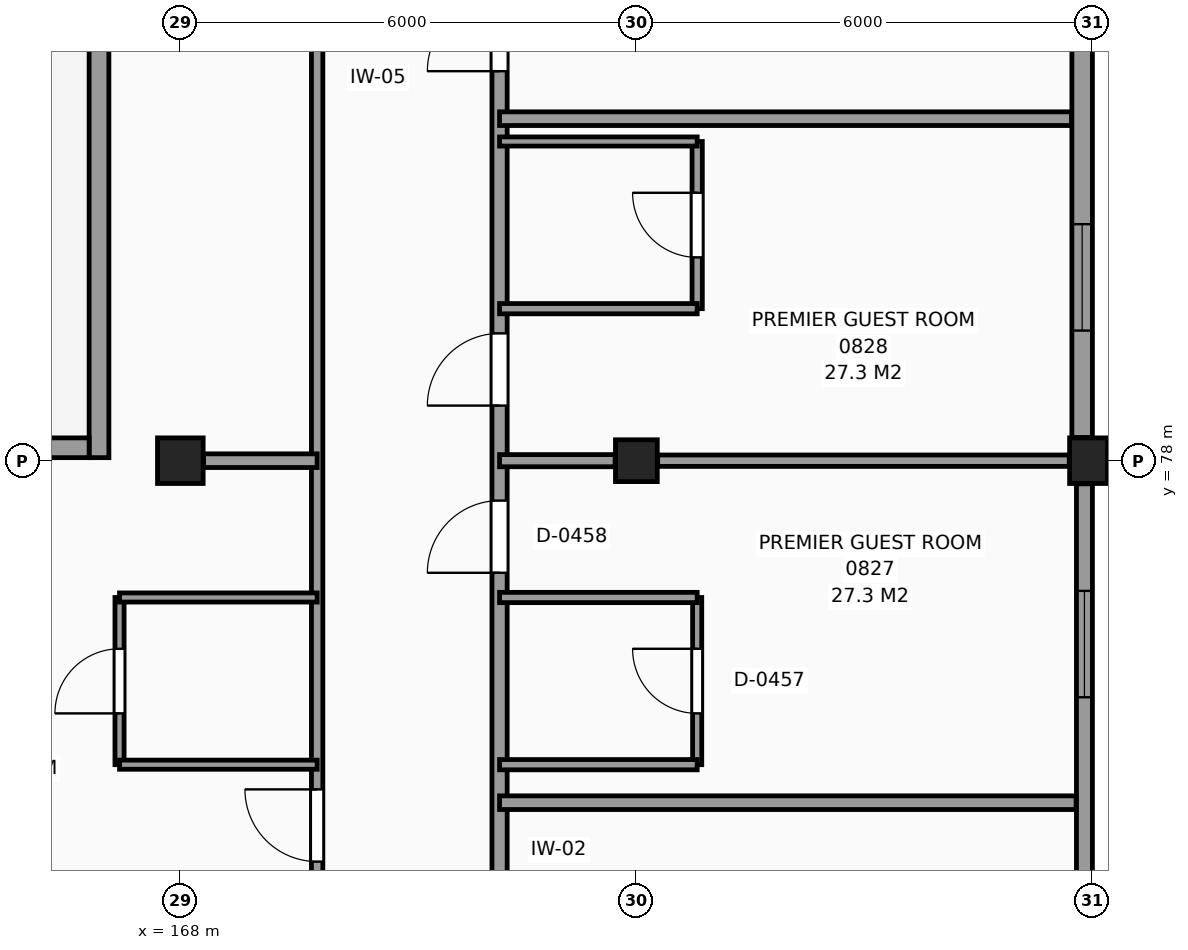
"""IFC4 building model, lengths in metres.
Left out: names, types, materials, properties, quantities, classifications, styles, units other than length and angle.
Written with IfcOpenShell. Run it as: python <this file> out.ifc"""

import sys

from ifc_helpers import new_model, si_unit, direction, frame, frame_2d, origin, origin_2d, place, context, subcontext, project, spatial, rectangle, extrude, element, fill, save


model = new_model("IFC4")
c1 = context("Model", 3, precision=1e-05, world=origin(), true_north=direction((0.0, 1.0)))
c2 = subcontext(c1, "Body", "Model", "MODEL_VIEW")
j1 = project(units=[si_unit("LENGTHUNIT", "METRE"), si_unit("PLANEANGLEUNIT", "RADIAN")], contexts=[c1])
p1 = place(None, origin())
s1 = spatial("IfcSite", under=j1, at=p1, CompositionType="ELEMENT")
p2 = place(p1, origin())
s2 = spatial("IfcBuilding", under=s1, at=p2, CompositionType="ELEMENT")
p3 = place(p2, frame((0.0, 0.0, 34.8)))
s3 = spatial("IfcBuildingStorey", under=s2, at=p3, CompositionType="ELEMENT", Elevation=34.8)
p4 = place(p3, frame((168.0, 78.0, 0.0), z_axis=(0.0, 0.0, 1.0), x_axis=(1.0, 0.0, 0.0)))
e1 = element("IfcColumn", 1, at=p4, inside=s3, PredefinedType="COLUMN", context=c2, shape_type="SweptSolid", body=[
    extrude(rectangle(XDim=0.6, YDim=0.6, at=origin_2d()), origin(), (0.0, 0.0, 1.0), 3.3),
])
p5 = place(p3, frame((174.0, 78.0, 0.0), z_axis=(0.0, 0.0, 1.0), x_axis=(1.0, 0.0, 0.0)))
e2 = element("IfcColumn", 2, at=p5, inside=s3, PredefinedType="COLUMN", context=c2, shape_type="SweptSolid", body=[
    extrude(rectangle(XDim=0.55, YDim=0.55, at=origin_2d()), origin(), (0.0, 0.0, 1.0), 3.3),
])
p6 = place(p3, frame((180.0, 78.0, 0.0), z_axis=(0.0, 0.0, 1.0), x_axis=(1.0, 0.0, 0.0)))
e3 = element("IfcColumn", 3, at=p6, inside=s3, PredefinedType="COLUMN", context=c2, shape_type="SweptSolid", body=[
    extrude(rectangle(XDim=0.6, YDim=0.6, at=origin_2d()), origin(), (0.0, 0.0, 1.0), 3.3),
])
p7 = place(p3, frame((179.895, 72.305, 0.0), z_axis=(0.0, 0.0, 1.0), x_axis=(0.0, 1.0, 0.0)))
e4 = element("IfcWall", 4, at=p7, inside=s3, PredefinedType="SOLIDWALL", context=c2, shape_type="SweptSolid", body=[
    extrude(rectangle(XDim=5.39, YDim=0.21, at=frame_2d((2.695, 0.0))), origin(), (0.0, 0.0, 1.0), 2.42),
])
p8 = place(p7, frame((2.582, 0.0, 0.8)))
e5 = element("IfcOpeningElement", 5, at=p8, cuts=e4, PredefinedType="OPENING", context=c2, shape_type="SweptSolid", body=[
    extrude(rectangle(XDim=1.4, YDim=1.4, at=frame_2d((0.7, 0.7))), frame((0.0, 0.115, 0.0), z_axis=(0.0, -1.0, 0.0), x_axis=(1.0, 0.0, 0.0)), (0.0, 0.0, 1.0), 0.23),
])
p9 = place(p3, frame((179.865, 78.305, 0.0), z_axis=(0.0, 0.0, 1.0), x_axis=(0.0, 1.0, 0.0)))
e6 = element("IfcWall", 6, at=p9, inside=s3, PredefinedType="SOLIDWALL", context=c2, shape_type="SweptSolid", body=[
    extrude(rectangle(XDim=5.39, YDim=0.27, at=frame_2d((2.695, 0.0))), origin(), (0.0, 0.0, 1.0), 2.42),
])
p10 = place(p9, frame((1.407, 0.0, 0.8)))
e7 = element("IfcOpeningElement", 7, at=p10, cuts=e6, PredefinedType="OPENING", context=c2, shape_type="SweptSolid", body=[
    extrude(rectangle(XDim=1.4, YDim=1.4, at=frame_2d((0.7, 0.7))), frame((0.0, 0.145, 0.0), z_axis=(0.0, -1.0, 0.0), x_axis=(1.0, 0.0, 0.0)), (0.0, 0.0, 1.0), 0.29),
])
p11 = place(p3, frame((166.93, 78.04, 0.0), z_axis=(0.0, 0.0, 1.0), x_axis=(0.0, 1.0, 0.0)))
e8 = element("IfcWall", 8, at=p11, inside=s3, PredefinedType="SHEAR", context=c2, shape_type="SweptSolid", body=[
    extrude(rectangle(XDim=10.72, YDim=0.26, at=frame_2d((5.36, 0.0))), origin(), (0.0, 0.0, 1.0), 3.3),
])
p12 = place(p3, frame((163.2, 78.17, 0.0), z_axis=(0.0, 0.0, 1.0), x_axis=(1.0, 0.0, 0.0)))
e9 = element("IfcWall", 9, at=p12, inside=s3, PredefinedType="SHEAR", context=c2, shape_type="SweptSolid", body=[
    extrude(rectangle(XDim=3.6, YDim=0.26, at=frame_2d((1.8, 0.0))), origin(), (0.0, 0.0, 1.0), 3.3),
])
p13 = place(p3, frame((167.2, 74.0, 0.0), z_axis=(0.0, 0.0, 1.0), x_axis=(0.0, 1.0, 0.0)))
e10 = element("IfcWall", 10, at=p13, inside=s3, PredefinedType="PARTITIONING", context=c2, shape_type="SweptSolid", body=[
    extrude(rectangle(XDim=2.2, YDim=0.12, at=frame_2d((1.1, 0.0))), origin(), (0.0, 0.0, 1.0), 3.07),
])
p14 = place(p13, frame((0.675, 0.0, 0.0)))
e11 = element("IfcOpeningElement", 11, at=p14, cuts=e10, PredefinedType="OPENING", context=c2, shape_type="SweptSolid", body=[
    extrude(rectangle(XDim=0.85, YDim=2.1, at=frame_2d((0.425, 1.05))), frame((0.0, 0.07, 0.0), z_axis=(0.0, -1.0, 0.0), x_axis=(1.0, 0.0, 0.0)), (0.0, 0.0, 1.0), 0.14),
])
p15 = place(p3, frame((169.8, 42.235, 0.0), z_axis=(0.0, 0.0, 1.0), x_axis=(0.0, 1.0, 0.0)))
e12 = element("IfcWall", 12, at=p15, inside=s3, PredefinedType="PARTITIONING", context=c2, shape_type="SweptSolid", body=[
    extrude(rectangle(XDim=65.585, YDim=0.15, at=frame_2d((32.792, 0.0))), origin(), (0.0, 0.0, 1.0), 3.07),
])
p16 = place(p15, frame((50.165, 0.0, 0.0)))
e13 = element("IfcOpeningElement", 13, at=p16, cuts=e12, PredefinedType="OPENING", context=c2, shape_type="SweptSolid", body=[
    extrude(rectangle(XDim=1.2, YDim=2.2, at=frame_2d((0.6, 1.1))), frame((0.0, 0.085, 0.0), z_axis=(0.0, -1.0, 0.0), x_axis=(1.0, 0.0, 0.0)), (0.0, 0.0, 1.0), 0.17),
])
p17 = place(p15, frame((0.44, 0.0, 0.0)))
e14 = element("IfcOpeningElement", 14, at=p17, cuts=e12, PredefinedType="OPENING", context=c2, shape_type="SweptSolid", body=[
    extrude(rectangle(XDim=0.95, YDim=2.1, at=frame_2d((0.475, 1.05))), frame((0.0, 0.085, 0.0), z_axis=(0.0, -1.0, 0.0), x_axis=(1.0, 0.0, 0.0)), (0.0, 0.0, 1.0), 0.17),
])
p18 = place(p15, frame((6.49, 0.0, 0.0)))
e15 = element("IfcOpeningElement", 15, at=p18, cuts=e12, PredefinedType="OPENING", context=c2, shape_type="SweptSolid", body=[
    extrude(rectangle(XDim=0.95, YDim=2.1, at=frame_2d((0.475, 1.05))), frame((0.0, 0.085, 0.0), z_axis=(0.0, -1.0, 0.0), x_axis=(1.0, 0.0, 0.0)), (0.0, 0.0, 1.0), 0.17),
])
p19 = place(p15, frame((12.49, 0.0, 0.0)))
e16 = element("IfcOpeningElement", 16, at=p19, cuts=e12, PredefinedType="OPENING", context=c2, shape_type="SweptSolid", body=[
    extrude(rectangle(XDim=0.95, YDim=2.1, at=frame_2d((0.475, 1.05))), frame((0.0, 0.085, 0.0), z_axis=(0.0, -1.0, 0.0), x_axis=(1.0, 0.0, 0.0)), (0.0, 0.0, 1.0), 0.17),
])
p20 = place(p15, frame((18.49, 0.0, 0.0)))
e17 = element("IfcOpeningElement", 17, at=p20, cuts=e12, PredefinedType="OPENING", context=c2, shape_type="SweptSolid", body=[
    extrude(rectangle(XDim=0.95, YDim=2.1, at=frame_2d((0.475, 1.05))), frame((0.0, 0.085, 0.0), z_axis=(0.0, -1.0, 0.0), x_axis=(1.0, 0.0, 0.0)), (0.0, 0.0, 1.0), 0.17),
])
p21 = place(p15, frame((24.49, 0.0, 0.0)))
e18 = element("IfcOpeningElement", 18, at=p21, cuts=e12, PredefinedType="OPENING", context=c2, shape_type="SweptSolid", body=[
    extrude(rectangle(XDim=0.95, YDim=2.1, at=frame_2d((0.475, 1.05))), frame((0.0, 0.085, 0.0), z_axis=(0.0, -1.0, 0.0), x_axis=(1.0, 0.0, 0.0)), (0.0, 0.0, 1.0), 0.17),
])
p22 = place(p15, frame((30.49, 0.0, 0.0)))
e19 = element("IfcOpeningElement", 19, at=p22, cuts=e12, PredefinedType="OPENING", context=c2, shape_type="SweptSolid", body=[
    extrude(rectangle(XDim=0.95, YDim=2.1, at=frame_2d((0.475, 1.05))), frame((0.0, 0.085, 0.0), z_axis=(0.0, -1.0, 0.0), x_axis=(1.0, 0.0, 0.0)), (0.0, 0.0, 1.0), 0.17),
])
p23 = place(p15, frame((54.49, 0.0, 0.0)))
e20 = element("IfcOpeningElement", 20, at=p23, cuts=e12, PredefinedType="OPENING", context=c2, shape_type="SweptSolid", body=[
    extrude(rectangle(XDim=0.95, YDim=2.1, at=frame_2d((0.475, 1.05))), frame((0.0, 0.085, 0.0), z_axis=(0.0, -1.0, 0.0), x_axis=(1.0, 0.0, 0.0)), (0.0, 0.0, 1.0), 0.17),
])
p24 = place(p15, frame((60.49, 0.0, 0.0)))
e21 = element("IfcOpeningElement", 21, at=p24, cuts=e12, PredefinedType="OPENING", context=c2, shape_type="SweptSolid", body=[
    extrude(rectangle(XDim=0.95, YDim=2.1, at=frame_2d((0.475, 1.05))), frame((0.0, 0.085, 0.0), z_axis=(0.0, -1.0, 0.0), x_axis=(1.0, 0.0, 0.0)), (0.0, 0.0, 1.0), 0.17),
])
p25 = place(p3, frame((172.2, 42.235, 0.0), z_axis=(0.0, 0.0, 1.0), x_axis=(0.0, 1.0, 0.0)))
e22 = element("IfcWall", 22, at=p25, inside=s3, PredefinedType="PARTITIONING", context=c2, shape_type="SweptSolid", body=[
    extrude(rectangle(XDim=65.585, YDim=0.2, at=frame_2d((32.792, 0.0))), origin(), (0.0, 0.0, 1.0), 3.07),
])
p26 = place(p25, frame((7.59, 0.0, 0.0)))
e23 = element("IfcOpeningElement", 23, at=p26, cuts=e22, PredefinedType="OPENING", context=c2, shape_type="SweptSolid", body=[
    extrude(rectangle(XDim=0.95, YDim=2.1, at=frame_2d((0.475, 1.05))), frame((0.0, 0.11, 0.0), z_axis=(0.0, -1.0, 0.0), x_axis=(1.0, 0.0, 0.0)), (0.0, 0.0, 1.0), 0.22),
])
p27 = place(p25, frame((12.09, 0.0, 0.0)))
e24 = element("IfcOpeningElement", 24, at=p27, cuts=e22, PredefinedType="OPENING", context=c2, shape_type="SweptSolid", body=[
    extrude(rectangle(XDim=0.95, YDim=2.1, at=frame_2d((0.475, 1.05))), frame((0.0, 0.11, 0.0), z_axis=(0.0, -1.0, 0.0), x_axis=(1.0, 0.0, 0.0)), (0.0, 0.0, 1.0), 0.22),
])
p28 = place(p25, frame((16.29, 0.0, 0.0)))
e25 = element("IfcOpeningElement", 25, at=p28, cuts=e22, PredefinedType="OPENING", context=c2, shape_type="SweptSolid", body=[
    extrude(rectangle(XDim=0.95, YDim=2.1, at=frame_2d((0.475, 1.05))), frame((0.0, 0.11, 0.0), z_axis=(0.0, -1.0, 0.0), x_axis=(1.0, 0.0, 0.0)), (0.0, 0.0, 1.0), 0.22),
])
p29 = place(p25, frame((18.49, 0.0, 0.0)))
e26 = element("IfcOpeningElement", 26, at=p29, cuts=e22, PredefinedType="OPENING", context=c2, shape_type="SweptSolid", body=[
    extrude(rectangle(XDim=0.95, YDim=2.1, at=frame_2d((0.475, 1.05))), frame((0.0, 0.11, 0.0), z_axis=(0.0, -1.0, 0.0), x_axis=(1.0, 0.0, 0.0)), (0.0, 0.0, 1.0), 0.22),
])
p30 = place(p25, frame((24.49, 0.0, 0.0)))
e27 = element("IfcOpeningElement", 27, at=p30, cuts=e22, PredefinedType="OPENING", context=c2, shape_type="SweptSolid", body=[
    extrude(rectangle(XDim=0.95, YDim=2.1, at=frame_2d((0.475, 1.05))), frame((0.0, 0.11, 0.0), z_axis=(0.0, -1.0, 0.0), x_axis=(1.0, 0.0, 0.0)), (0.0, 0.0, 1.0), 0.22),
])
p31 = place(p25, frame((34.29, 0.0, 0.0)))
e28 = element("IfcOpeningElement", 28, at=p31, cuts=e22, PredefinedType="OPENING", context=c2, shape_type="SweptSolid", body=[
    extrude(rectangle(XDim=0.95, YDim=2.1, at=frame_2d((0.475, 1.05))), frame((0.0, 0.11, 0.0), z_axis=(0.0, -1.0, 0.0), x_axis=(1.0, 0.0, 0.0)), (0.0, 0.0, 1.0), 0.22),
])
p32 = place(p25, frame((36.49, 0.0, 0.0)))
e29 = element("IfcOpeningElement", 29, at=p32, cuts=e22, PredefinedType="OPENING", context=c2, shape_type="SweptSolid", body=[
    extrude(rectangle(XDim=0.95, YDim=2.1, at=frame_2d((0.475, 1.05))), frame((0.0, 0.11, 0.0), z_axis=(0.0, -1.0, 0.0), x_axis=(1.0, 0.0, 0.0)), (0.0, 0.0, 1.0), 0.22),
])
p33 = place(p25, frame((40.89, 0.0, 0.0)))
e30 = element("IfcOpeningElement", 30, at=p33, cuts=e22, PredefinedType="OPENING", context=c2, shape_type="SweptSolid", body=[
    extrude(rectangle(XDim=0.95, YDim=2.1, at=frame_2d((0.475, 1.05))), frame((0.0, 0.11, 0.0), z_axis=(0.0, -1.0, 0.0), x_axis=(1.0, 0.0, 0.0)), (0.0, 0.0, 1.0), 0.22),
])
p34 = place(p25, frame((45.39, 0.0, 0.0)))
e31 = element("IfcOpeningElement", 31, at=p34, cuts=e22, PredefinedType="OPENING", context=c2, shape_type="SweptSolid", body=[
    extrude(rectangle(XDim=0.95, YDim=2.1, at=frame_2d((0.475, 1.05))), frame((0.0, 0.11, 0.0), z_axis=(0.0, -1.0, 0.0), x_axis=(1.0, 0.0, 0.0)), (0.0, 0.0, 1.0), 0.22),
])
p35 = place(p25, frame((54.49, 0.0, 0.0)))
e32 = element("IfcOpeningElement", 32, at=p35, cuts=e22, PredefinedType="OPENING", context=c2, shape_type="SweptSolid", body=[
    extrude(rectangle(XDim=0.95, YDim=2.1, at=frame_2d((0.475, 1.05))), frame((0.0, 0.11, 0.0), z_axis=(0.0, -1.0, 0.0), x_axis=(1.0, 0.0, 0.0)), (0.0, 0.0, 1.0), 0.22),
])
p36 = place(p25, frame((60.49, 0.0, 0.0)))
e33 = element("IfcOpeningElement", 33, at=p36, cuts=e22, PredefinedType="OPENING", context=c2, shape_type="SweptSolid", body=[
    extrude(rectangle(XDim=0.95, YDim=2.1, at=frame_2d((0.475, 1.05))), frame((0.0, 0.11, 0.0), z_axis=(0.0, -1.0, 0.0), x_axis=(1.0, 0.0, 0.0)), (0.0, 0.0, 1.0), 0.22),
])
p37 = place(p3, frame((174.8, 74.0, 0.0), z_axis=(0.0, 0.0, 1.0), x_axis=(0.0, 1.0, 0.0)))
e34 = element("IfcWall", 34, at=p37, inside=s3, PredefinedType="PARTITIONING", context=c2, shape_type="SweptSolid", body=[
    extrude(rectangle(XDim=2.2, YDim=0.12, at=frame_2d((1.1, 0.0))), origin(), (0.0, 0.0, 1.0), 3.07),
])
p38 = place(p37, frame((0.675, 0.0, 0.0)))
e35 = element("IfcOpeningElement", 35, at=p38, cuts=e34, PredefinedType="OPENING", context=c2, shape_type="SweptSolid", body=[
    extrude(rectangle(XDim=0.85, YDim=2.1, at=frame_2d((0.425, 1.05))), frame((0.0, 0.07, 0.0), z_axis=(0.0, -1.0, 0.0), x_axis=(1.0, 0.0, 0.0)), (0.0, 0.0, 1.0), 0.14),
])
p39 = place(p3, frame((174.8, 80.0, 0.0), z_axis=(0.0, 0.0, 1.0), x_axis=(0.0, 1.0, 0.0)))
e36 = element("IfcWall", 36, at=p39, inside=s3, PredefinedType="PARTITIONING", context=c2, shape_type="SweptSolid", body=[
    extrude(rectangle(XDim=2.2, YDim=0.135, at=frame_2d((1.1, 0.0))), origin(), (0.0, 0.0, 1.0), 3.07),
])
p40 = place(p39, frame((0.675, 0.0, 0.0)))
e37 = element("IfcOpeningElement", 37, at=p40, cuts=e36, PredefinedType="OPENING", context=c2, shape_type="SweptSolid", body=[
    extrude(rectangle(XDim=0.85, YDim=2.1, at=frame_2d((0.425, 1.05))), frame((0.0, 0.078, 0.0), z_axis=(0.0, -1.0, 0.0), x_axis=(1.0, 0.0, 0.0)), (0.0, 0.0, 1.0), 0.155),
])
p41 = place(p3, frame((172.2, 73.5, 0.0), z_axis=(0.0, 0.0, 1.0), x_axis=(1.0, 0.0, 0.0)))
e38 = element("IfcWall", 38, at=p41, inside=s3, PredefinedType="PARTITIONING", context=c2, shape_type="SweptSolid", body=[
    extrude(rectangle(XDim=7.585, YDim=0.18, at=frame_2d((3.792, 0.0))), origin(), (0.0, 0.0, 1.0), 3.07),
])
p42 = place(p3, frame((167.2, 74.0, 0.0), z_axis=(0.0, 0.0, 1.0), x_axis=(1.0, 0.0, 0.0)))
e39 = element("IfcWall", 39, at=p42, inside=s3, PredefinedType="PARTITIONING", context=c2, shape_type="SweptSolid", body=[
    extrude(rectangle(XDim=2.6, YDim=0.12, at=frame_2d((1.3, 0.0))), origin(), (0.0, 0.0, 1.0), 3.07),
])
p43 = place(p3, frame((172.2, 74.0, 0.0), z_axis=(0.0, 0.0, 1.0), x_axis=(1.0, 0.0, 0.0)))
e40 = element("IfcWall", 40, at=p43, inside=s3, PredefinedType="PARTITIONING", context=c2, shape_type="SweptSolid", body=[
    extrude(rectangle(XDim=2.6, YDim=0.135, at=frame_2d((1.3, 0.0))), origin(), (0.0, 0.0, 1.0), 3.07),
])
p44 = place(p3, frame((167.2, 76.2, 0.0), z_axis=(0.0, 0.0, 1.0), x_axis=(1.0, 0.0, 0.0)))
e41 = element("IfcWall", 41, at=p44, inside=s3, PredefinedType="PARTITIONING", context=c2, shape_type="SweptSolid", body=[
    extrude(rectangle(XDim=2.6, YDim=0.12, at=frame_2d((1.3, 0.0))), origin(), (0.0, 0.0, 1.0), 3.07),
])
p45 = place(p3, frame((172.2, 76.2, 0.0), z_axis=(0.0, 0.0, 1.0), x_axis=(1.0, 0.0, 0.0)))
e42 = element("IfcWall", 42, at=p45, inside=s3, PredefinedType="PARTITIONING", context=c2, shape_type="SweptSolid", body=[
    extrude(rectangle(XDim=2.6, YDim=0.135, at=frame_2d((1.3, 0.0))), origin(), (0.0, 0.0, 1.0), 3.07),
])
p46 = place(p3, frame((168.305, 78.0, 0.0), z_axis=(0.0, 0.0, 1.0), x_axis=(1.0, 0.0, 0.0)))
e43 = element("IfcWall", 43, at=p46, inside=s3, PredefinedType="PARTITIONING", context=c2, shape_type="SweptSolid", body=[
    extrude(rectangle(XDim=1.495, YDim=0.18, at=frame_2d((0.748, 0.0))), origin(), (0.0, 0.0, 1.0), 2.27),
])
p47 = place(p3, frame((172.2, 78.0, 0.0), z_axis=(0.0, 0.0, 1.0), x_axis=(1.0, 0.0, 0.0)))
e44 = element("IfcWall", 44, at=p47, inside=s3, PredefinedType="PARTITIONING", context=c2, shape_type="SweptSolid", body=[
    extrude(rectangle(XDim=1.52, YDim=0.16, at=frame_2d((0.76, 0.0))), origin(), (0.0, 0.0, 1.0), 2.27),
])
p48 = place(p3, frame((174.28, 78.0, 0.0), z_axis=(0.0, 0.0, 1.0), x_axis=(1.0, 0.0, 0.0)))
e45 = element("IfcWall", 45, at=p48, inside=s3, PredefinedType="PARTITIONING", context=c2, shape_type="SweptSolid", body=[
    extrude(rectangle(XDim=5.415, YDim=0.15, at=frame_2d((2.708, 0.0))), origin(), (0.0, 0.0, 1.0), 2.27),
])
p49 = place(p3, frame((172.2, 80.0, 0.0), z_axis=(0.0, 0.0, 1.0), x_axis=(1.0, 0.0, 0.0)))
e46 = element("IfcWall", 46, at=p49, inside=s3, PredefinedType="PARTITIONING", context=c2, shape_type="SweptSolid", body=[
    extrude(rectangle(XDim=2.6, YDim=0.135, at=frame_2d((1.3, 0.0))), origin(), (0.0, 0.0, 1.0), 3.07),
])
p50 = place(p3, frame((172.2, 82.2, 0.0), z_axis=(0.0, 0.0, 1.0), x_axis=(1.0, 0.0, 0.0)))
e47 = element("IfcWall", 47, at=p50, inside=s3, PredefinedType="PARTITIONING", context=c2, shape_type="SweptSolid", body=[
    extrude(rectangle(XDim=2.6, YDim=0.12, at=frame_2d((1.3, 0.0))), origin(), (0.0, 0.0, 1.0), 3.07),
])
p51 = place(p3, frame((172.2, 82.5, 0.0), z_axis=(0.0, 0.0, 1.0), x_axis=(1.0, 0.0, 0.0)))
e48 = element("IfcWall", 48, at=p51, inside=s3, PredefinedType="PARTITIONING", context=c2, shape_type="SweptSolid", body=[
    extrude(rectangle(XDim=7.525, YDim=0.18, at=frame_2d((3.763, 0.0))), origin(), (0.0, 0.0, 1.0), 3.07),
])
p52 = place(p8, origin())
e49 = element("IfcWindow", 49, at=p52, inside=s3, PartitioningType="SINGLE_PANEL", PredefinedType="WINDOW", context=c2, shape_type="SweptSolid", body=[
    extrude(rectangle(XDim=1.4, YDim=1.4, at=frame_2d((0.7, 0.7))), frame((0.0, 0.03, 0.0), z_axis=(0.0, -1.0, 0.0), x_axis=(1.0, 0.0, 0.0)), (0.0, 0.0, 1.0), 0.06),
])
fill(e5, e49)
p53 = place(p10, origin())
e50 = element("IfcWindow", 50, at=p53, inside=s3, PartitioningType="SINGLE_PANEL", PredefinedType="WINDOW", context=c2, shape_type="SweptSolid", body=[
    extrude(rectangle(XDim=1.4, YDim=1.4, at=frame_2d((0.7, 0.7))), frame((0.0, 0.03, 0.0), z_axis=(0.0, -1.0, 0.0), x_axis=(1.0, 0.0, 0.0)), (0.0, 0.0, 1.0), 0.06),
])
fill(e7, e50)
p54 = place(p38, origin())
e51 = element("IfcDoor", 51, at=p54, inside=s3, OperationType="SINGLE_SWING_RIGHT", PredefinedType="DOOR", context=c2, shape_type="SweptSolid", body=[
    extrude(rectangle(XDim=0.85, YDim=2.1, at=frame_2d((0.425, 1.05))), frame((0.0, 0.025, 0.0), z_axis=(0.0, -1.0, 0.0), x_axis=(1.0, 0.0, 0.0)), (0.0, 0.0, 1.0), 0.05),
])
fill(e35, e51)
p55 = place(p31, origin())
e52 = element("IfcDoor", 52, at=p55, inside=s3, OperationType="SINGLE_SWING_LEFT", PredefinedType="DOOR", context=c2, shape_type="SweptSolid", body=[
    extrude(rectangle(XDim=0.95, YDim=2.1, at=frame_2d((0.475, 1.05))), frame((0.0, 0.025, 0.0), z_axis=(0.0, -1.0, 0.0), x_axis=(1.0, 0.0, 0.0)), (0.0, 0.0, 1.0), 0.05),
])
fill(e28, e52)
p56 = place(p40, origin())
e53 = element("IfcDoor", 53, at=p56, inside=s3, OperationType="SINGLE_SWING_RIGHT", PredefinedType="DOOR", context=c2, shape_type="SweptSolid", body=[
    extrude(rectangle(XDim=0.85, YDim=2.1, at=frame_2d((0.425, 1.05))), frame((0.0, 0.025, 0.0), z_axis=(0.0, -1.0, 0.0), x_axis=(1.0, 0.0, 0.0)), (0.0, 0.0, 1.0), 0.05),
])
fill(e37, e53)
p57 = place(p32, origin())
e54 = element("IfcDoor", 54, at=p57, inside=s3, OperationType="SINGLE_SWING_LEFT", PredefinedType="DOOR", context=c2, shape_type="SweptSolid", body=[
    extrude(rectangle(XDim=0.95, YDim=2.1, at=frame_2d((0.475, 1.05))), frame((0.0, 0.025, 0.0), z_axis=(0.0, -1.0, 0.0), x_axis=(1.0, 0.0, 0.0)), (0.0, 0.0, 1.0), 0.05),
])
fill(e29, e54)
p58 = place(p33, origin())
e55 = element("IfcDoor", 55, at=p58, inside=s3, OperationType="SINGLE_SWING_LEFT", PredefinedType="DOOR", context=c2, shape_type="SweptSolid", body=[
    extrude(rectangle(XDim=0.95, YDim=2.1, at=frame_2d((0.475, 1.05))), frame((0.0, 0.025, 0.0), z_axis=(0.0, -1.0, 0.0), x_axis=(1.0, 0.0, 0.0)), (0.0, 0.0, 1.0), 0.05),
])
fill(e30, e55)
p59 = place(p14, origin())
e56 = element("IfcDoor", 56, at=p59, inside=s3, OperationType="SINGLE_SWING_LEFT", PredefinedType="DOOR", context=c2, shape_type="SweptSolid", body=[
    extrude(rectangle(XDim=0.85, YDim=2.1, at=frame_2d((0.425, 1.05))), frame((0.0, 0.025, 0.0), z_axis=(0.0, -1.0, 0.0), x_axis=(1.0, 0.0, 0.0)), (0.0, 0.0, 1.0), 0.05),
])
fill(e11, e56)
p60 = place(p22, origin())
e57 = element("IfcDoor", 57, at=p60, inside=s3, OperationType="SINGLE_SWING_RIGHT", PredefinedType="DOOR", context=c2, shape_type="SweptSolid", body=[
    extrude(rectangle(XDim=0.95, YDim=2.1, at=frame_2d((0.475, 1.05))), frame((0.0, 0.025, 0.0), z_axis=(0.0, -1.0, 0.0), x_axis=(1.0, 0.0, 0.0)), (0.0, 0.0, 1.0), 0.05),
])
fill(e19, e57)
save(model, sys.argv[1])
